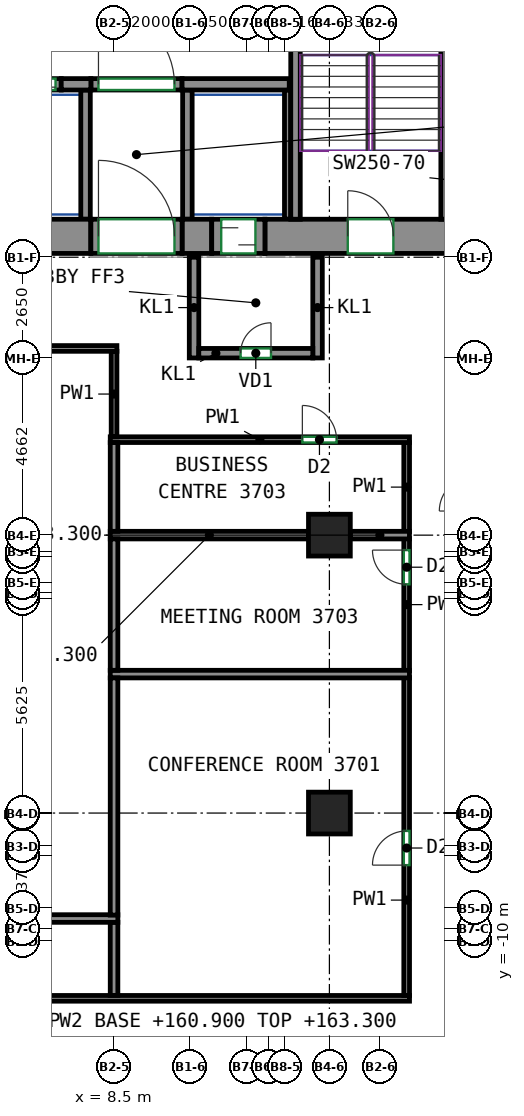
"""IFC4 building model, lengths in metres.
Left out: names, types, materials, properties, quantities, classifications, styles, units other than length and angle.
Written with IfcOpenShell. Run it as: python <this file> out.ifc"""

import sys

from ifc_helpers import new_model, si_unit, direction, frame, frame_2d, origin, origin_2d, place, context, subcontext, project, spatial, rectangle, extrude, source, transform, mapped, element, fill, save


model = new_model("IFC4")
c1 = context("Model", 3, precision=1e-05, world=origin(), true_north=direction((0.0, 1.0)))
c2 = subcontext(c1, "Body", "Model", "MODEL_VIEW")
j1 = project(units=[si_unit("LENGTHUNIT", "METRE"), si_unit("PLANEANGLEUNIT", "RADIAN")], contexts=[c1])
p1 = place(None, origin())
s1 = spatial("IfcSite", under=j1, at=p1, CompositionType="ELEMENT")
p2 = place(p1, origin())
s2 = spatial("IfcBuilding", under=s1, at=p2, CompositionType="ELEMENT")
p3 = place(p2, frame((0.0, 0.0, 160.9)))
s3 = spatial("IfcBuildingStorey", under=s2, at=p3, CompositionType="ELEMENT", Elevation=160.9)
m1 = source(origin(), c2, "Body", "SweptSolid", [
    extrude(rectangle(XDim=1.1, YDim=1.1, at=origin_2d()), origin(), (0.0, 0.0, 1.0), 3.0),
])
for number, where, z_axis, x_axis in (
    (1, (14.167, -6.625, 0.0), (0.0, 0.0, 1.0), (1.0, 0.0, 0.0)),
    (2, (14.167, 0.688, 0.0), (0.0, 0.0, 1.0), (1.0, 0.0, 0.0)),
):
    element("IfcColumn", number, at=place(p3, frame(where, z_axis=z_axis, x_axis=x_axis)), inside=s3, PredefinedType="COLUMN", context=c2, shape_type="MappedRepresentation", body=[
        mapped(m1, transform((0.0, 0.0, 0.0))),
    ])
m2 = source(origin(), c2, "Body", "SweptSolid", [
    extrude(rectangle(XDim=14.18, YDim=0.9, at=frame_2d((7.09, 0.0))), origin(), (0.0, 0.0, 1.0), 3.0),
])
p4 = place(p3, frame((-6.29, 8.55, 0.0), z_axis=(0.0, 0.0, 1.0), x_axis=(1.0, 0.0, 0.0)))
e3 = element("IfcWall", 3, at=p4, inside=s3, PredefinedType="SHEAR", context=c2, shape_type="MappedRepresentation", body=[
    mapped(m2, transform((0.0, 0.0, 0.0))),
])
m3 = source(origin(), c2, "Body", "SweptSolid", [
    extrude(rectangle(XDim=0.78, YDim=0.9, at=frame_2d((0.39, 0.0))), origin(), (0.0, 0.0, 1.0), 3.0),
])
p5 = place(p3, frame((10.29, 8.55, 0.0), z_axis=(0.0, 0.0, 1.0), x_axis=(1.0, 0.0, 0.0)))
e4 = element("IfcWall", 4, at=p5, inside=s3, PredefinedType="SHEAR", context=c2, shape_type="MappedRepresentation", body=[
    mapped(m3, transform((0.0, 0.0, 0.0))),
])
m4 = source(origin(), c2, "Body", "SweptSolid", [
    extrude(rectangle(XDim=5.53, YDim=0.9, at=frame_2d((2.765, 0.0))), origin(), (0.0, 0.0, 1.0), 3.0),
])
p6 = place(p3, frame((12.47, 8.55, 0.0), z_axis=(0.0, 0.0, 1.0), x_axis=(1.0, 0.0, 0.0)))
e5 = element("IfcWall", 5, at=p6, inside=s3, PredefinedType="SHEAR", context=c2, shape_type="MappedRepresentation", body=[
    mapped(m4, transform((0.0, 0.0, 0.0))),
])
p7 = place(p6, frame((2.18, 0.0, 0.0)))
e6 = element("IfcOpeningElement", 6, at=p7, cuts=e5, PredefinedType="OPENING", context=c2, shape_type="SweptSolid", body=[
    extrude(rectangle(XDim=1.2, YDim=2.1, at=frame_2d((0.6, 1.05))), frame((0.0, 0.46, 0.0), z_axis=(0.0, -1.0, 0.0), x_axis=(1.0, 0.0, 0.0)), (0.0, 0.0, 1.0), 0.92),
])
m5 = source(origin(), c2, "Body", "SweptSolid", [
    extrude(rectangle(XDim=12.0, YDim=0.9, at=frame_2d((6.0, 0.0))), origin(), (0.0, 0.0, 1.0), 3.0),
])
p8 = place(p3, frame((17.55, 9.0, 0.0), z_axis=(0.0, 0.0, 1.0), x_axis=(0.0, 1.0, 0.0)))
e7 = element("IfcWall", 7, at=p8, inside=s3, PredefinedType="SHEAR", context=c2, shape_type="MappedRepresentation", body=[
    mapped(m5, transform((0.0, 0.0, 0.0))),
])
m6 = source(origin(), c2, "Body", "SweptSolid", [
    extrude(rectangle(XDim=7.75, YDim=0.25, at=frame_2d((3.875, 0.0))), origin(), (0.0, 0.0, 1.0), 3.0),
])
p9 = place(p3, frame((13.275, 9.0, 0.0), z_axis=(0.0, 0.0, 1.0), x_axis=(0.0, 1.0, 0.0)))
e8 = element("IfcWall", 8, at=p9, inside=s3, PredefinedType="SHEAR", context=c2, shape_type="MappedRepresentation", body=[
    mapped(m6, transform((0.0, 0.0, 0.0))),
])
m7 = source(origin(), c2, "Body", "SweptSolid", [
    extrude(rectangle(XDim=0.78, YDim=0.3, at=frame_2d((0.39, 0.0))), origin(), (0.0, 0.0, 1.0), 3.0),
])
p10 = place(p3, frame((7.11, 12.55, 0.0), z_axis=(0.0, 0.0, 1.0), x_axis=(1.0, 0.0, 0.0)))
e9 = element("IfcWall", 9, at=p10, inside=s3, PredefinedType="SHEAR", context=c2, shape_type="MappedRepresentation", body=[
    mapped(m7, transform((0.0, 0.0, 0.0))),
])
m8 = source(origin(), c2, "Body", "SweptSolid", [
    extrude(rectangle(XDim=2.82, YDim=0.3, at=frame_2d((1.41, 0.0))), origin(), (0.0, 0.0, 1.0), 3.0),
])
p11 = place(p3, frame((10.29, 12.55, 0.0), z_axis=(0.0, 0.0, 1.0), x_axis=(1.0, 0.0, 0.0)))
e10 = element("IfcWall", 10, at=p11, inside=s3, PredefinedType="SHEAR", context=c2, shape_type="MappedRepresentation", body=[
    mapped(m8, transform((0.0, 0.0, 0.0))),
])
m9 = source(origin(), c2, "Body", "SweptSolid", [
    extrude(rectangle(XDim=1.4, YDim=0.3, at=frame_2d((0.7, 0.0))), origin(), (0.0, 0.0, 1.0), 3.0),
])
p12 = place(p3, frame((5.71, 12.55, 0.0), z_axis=(0.0, 0.0, 1.0), x_axis=(1.0, 0.0, 0.0)))
e11 = element("IfcWall", 11, at=p12, inside=s3, PredefinedType="PARTITIONING", context=c2, shape_type="MappedRepresentation", body=[
    mapped(m9, transform((0.0, 0.0, 0.0))),
])
p13 = place(p12, frame((0.15, 0.0, 0.0)))
e12 = element("IfcOpeningElement", 12, at=p13, cuts=e11, PredefinedType="OPENING", context=c2, shape_type="SweptSolid", body=[
    extrude(rectangle(XDim=1.1, YDim=2.1, at=frame_2d((0.55, 1.05))), frame((0.0, 0.16, 0.0), z_axis=(0.0, -1.0, 0.0), x_axis=(1.0, 0.0, 0.0)), (0.0, 0.0, 1.0), 0.32),
])
m10 = source(origin(), c2, "Body", "SweptSolid", [
    extrude(rectangle(XDim=2.4, YDim=0.3, at=frame_2d((1.2, 0.0))), origin(), (0.0, 0.0, 1.0), 3.0),
])
p14 = place(p3, frame((7.89, 12.55, 0.0), z_axis=(0.0, 0.0, 1.0), x_axis=(1.0, 0.0, 0.0)))
e13 = element("IfcWall", 13, at=p14, inside=s3, PredefinedType="PARTITIONING", context=c2, shape_type="MappedRepresentation", body=[
    mapped(m10, transform((0.0, 0.0, 0.0))),
])
p15 = place(p14, frame((0.2, 0.0, 0.0)))
e14 = element("IfcOpeningElement", 14, at=p15, cuts=e13, PredefinedType="OPENING", context=c2, shape_type="SweptSolid", body=[
    extrude(rectangle(XDim=2.0, YDim=2.1, at=frame_2d((1.0, 1.05))), frame((0.0, 0.16, 0.0), z_axis=(0.0, -1.0, 0.0), x_axis=(1.0, 0.0, 0.0)), (0.0, 0.0, 1.0), 0.32),
])
m11 = source(origin(), c2, "Body", "SweptSolid", [
    extrude(rectangle(XDim=2.65, YDim=0.25, at=frame_2d((1.325, 0.0))), origin(), (0.0, 0.0, 1.0), 3.0),
])
for number, where, z_axis, x_axis in (
    (15, (10.605, 5.35, 0.0), (0.0, 0.0, 1.0), (0.0, 1.0, 0.0)),
    (16, (13.855, 5.35, 0.0), (0.0, 0.0, 1.0), (0.0, 1.0, 0.0)),
):
    element("IfcWall", number, at=place(p3, frame(where, z_axis=z_axis, x_axis=x_axis)), inside=s3, PredefinedType="PARTITIONING", context=c2, shape_type="MappedRepresentation", body=[
        mapped(m11, transform((0.0, 0.0, 0.0))),
    ])
m12 = source(origin(), c2, "Body", "SweptSolid", [
    extrude(rectangle(XDim=3.0, YDim=0.25, at=frame_2d((1.5, 0.0))), origin(), (0.0, 0.0, 1.0), 3.0),
])
p16 = place(p3, frame((10.73, 5.475, 0.0), z_axis=(0.0, 0.0, 1.0), x_axis=(1.0, 0.0, 0.0)))
e17 = element("IfcWall", 17, at=p16, inside=s3, PredefinedType="PARTITIONING", context=c2, shape_type="MappedRepresentation", body=[
    mapped(m12, transform((0.0, 0.0, 0.0))),
])
p17 = place(p16, frame((1.1, 0.0, 0.0)))
e18 = element("IfcOpeningElement", 18, at=p17, cuts=e17, PredefinedType="OPENING", context=c2, shape_type="SweptSolid", body=[
    extrude(rectangle(XDim=0.8, YDim=2.0, at=frame_2d((0.4, 1.0))), frame((0.0, 0.135, 0.0), z_axis=(0.0, -1.0, 0.0), x_axis=(1.0, 0.0, 0.0)), (0.0, 0.0, 1.0), 0.27),
])
m13 = source(origin(), c2, "Body", "SweptSolid", [
    extrude(rectangle(XDim=3.4, YDim=0.25, at=frame_2d((1.7, 0.0))), origin(), (0.0, 0.0, 1.0), 3.0),
])
p18 = place(p3, frame((10.43, 9.0, 0.0), z_axis=(0.0, 0.0, 1.0), x_axis=(0.0, 1.0, 0.0)))
e19 = element("IfcWall", 19, at=p18, inside=s3, PredefinedType="PARTITIONING", context=c2, shape_type="MappedRepresentation", body=[
    mapped(m13, transform((0.0, 0.0, 0.0))),
])
m14 = source(origin(), c2, "Body", "SweptSolid", [
    extrude(rectangle(XDim=3.4, YDim=0.165, at=frame_2d((1.7, 0.0))), origin(), (0.0, 0.0, 1.0), 3.0),
])
p19 = place(p3, frame((13.067, 9.0, 0.0), z_axis=(0.0, 0.0, 1.0), x_axis=(0.0, 1.0, 0.0)))
e20 = element("IfcWall", 20, at=p19, inside=s3, PredefinedType="PARTITIONING", context=c2, shape_type="MappedRepresentation", body=[
    mapped(m14, transform((0.0, 0.0, 0.0))),
])
p20 = place(p3, frame((7.75, 9.0, 0.0), z_axis=(0.0, 0.0, 1.0), x_axis=(0.0, 1.0, 0.0)))
e21 = element("IfcWall", 21, at=p20, inside=s3, PredefinedType="PARTITIONING", context=c2, shape_type="MappedRepresentation", body=[
    mapped(m13, transform((0.0, 0.0, 0.0))),
])
m15 = source(origin(), c2, "Body", "SweptSolid", [
    extrude(rectangle(XDim=2.4, YDim=0.9, at=frame_2d((1.2, 0.0))), origin(), (0.0, 0.0, 1.0), 2.7),
])
p21 = place(p3, frame((7.89, 8.55, 0.0), z_axis=(0.0, 0.0, 1.0), x_axis=(1.0, 0.0, 0.0)))
e22 = element("IfcWall", 22, at=p21, inside=s3, PredefinedType="PARTITIONING", context=c2, shape_type="MappedRepresentation", body=[
    mapped(m15, transform((0.0, 0.0, 0.0))),
])
p22 = place(p21, frame((0.2, 0.0, 0.0)))
e23 = element("IfcOpeningElement", 23, at=p22, cuts=e22, PredefinedType="OPENING", context=c2, shape_type="SweptSolid", body=[
    extrude(rectangle(XDim=2.0, YDim=2.1, at=frame_2d((1.0, 1.05))), frame((0.0, 0.46, 0.0), z_axis=(0.0, -1.0, 0.0), x_axis=(1.0, 0.0, 0.0)), (0.0, 0.0, 1.0), 0.92),
])
m16 = source(origin(), c2, "Body", "SweptSolid", [
    extrude(rectangle(XDim=1.4, YDim=0.9, at=frame_2d((0.7, 0.0))), origin(), (0.0, 0.0, 1.0), 2.7),
])
p23 = place(p3, frame((11.07, 8.55, 0.0), z_axis=(0.0, 0.0, 1.0), x_axis=(1.0, 0.0, 0.0)))
e24 = element("IfcWall", 24, at=p23, inside=s3, PredefinedType="PARTITIONING", context=c2, shape_type="MappedRepresentation", body=[
    mapped(m16, transform((0.0, 0.0, 0.0))),
])
p24 = place(p23, frame((0.25, 0.0, 0.0)))
e25 = element("IfcOpeningElement", 25, at=p24, cuts=e24, PredefinedType="OPENING", context=c2, shape_type="SweptSolid", body=[
    extrude(rectangle(XDim=0.9, YDim=2.1, at=frame_2d((0.45, 1.05))), frame((0.0, 0.46, 0.0), z_axis=(0.0, -1.0, 0.0), x_axis=(1.0, 0.0, 0.0)), (0.0, 0.0, 1.0), 0.92),
])
p25 = place(p3, frame((-12.075, -11.5, 0.0), z_axis=(0.0, 0.0, 1.0), x_axis=(1.0, 0.0, 0.0)))
e26 = element("IfcWall", 26, at=p25, inside=s3, PredefinedType="PARTITIONING", context=c2, shape_type="SweptSolid", body=[
    extrude(rectangle(XDim=28.35, YDim=0.15, at=frame_2d((14.175, 0.0))), origin(), (0.0, 0.0, 1.0), 3.0),
])
p26 = place(p25, frame((11.373, 0.0, 0.0)))
e27 = element("IfcOpeningElement", 27, at=p26, cuts=e26, PredefinedType="OPENING", context=c2, shape_type="SweptSolid", body=[
    extrude(rectangle(XDim=0.9, YDim=2.1, at=frame_2d((0.45, 1.05))), frame((0.0, 0.085, 0.0), z_axis=(0.0, -1.0, 0.0), x_axis=(1.0, 0.0, 0.0)), (0.0, 0.0, 1.0), 0.17),
])
p27 = place(p3, frame((16.2, -11.425, 0.0), z_axis=(0.0, 0.0, 1.0), x_axis=(0.0, 1.0, 0.0)))
e28 = element("IfcWall", 28, at=p27, inside=s3, PredefinedType="PARTITIONING", context=c2, shape_type="SweptSolid", body=[
    extrude(rectangle(XDim=8.366, YDim=0.15, at=frame_2d((4.183, 0.0))), origin(), (0.0, 0.0, 1.0), 3.0),
])
p28 = place(p27, frame((3.43, 0.0, 0.0)))
e29 = element("IfcOpeningElement", 29, at=p28, cuts=e28, PredefinedType="OPENING", context=c2, shape_type="SweptSolid", body=[
    extrude(rectangle(XDim=0.9, YDim=2.1, at=frame_2d((0.45, 1.05))), frame((0.0, 0.085, 0.0), z_axis=(0.0, -1.0, 0.0), x_axis=(1.0, 0.0, 0.0)), (0.0, 0.0, 1.0), 0.17),
])
p29 = place(p3, frame((16.2, -2.879, 0.0), z_axis=(0.0, 0.0, 1.0), x_axis=(0.0, 1.0, 0.0)))
e30 = element("IfcWall", 30, at=p29, inside=s3, PredefinedType="PARTITIONING", context=c2, shape_type="SweptSolid", body=[
    extrude(rectangle(XDim=3.477, YDim=0.15, at=frame_2d((1.738, 0.0))), origin(), (0.0, 0.0, 1.0), 3.0),
])
p30 = place(p29, frame((2.273, 0.0, 0.0)))
e31 = element("IfcOpeningElement", 31, at=p30, cuts=e30, PredefinedType="OPENING", context=c2, shape_type="SweptSolid", body=[
    extrude(rectangle(XDim=0.9, YDim=2.1, at=frame_2d((0.45, 1.05))), frame((0.0, 0.085, 0.0), z_axis=(0.0, -1.0, 0.0), x_axis=(1.0, 0.0, 0.0)), (0.0, 0.0, 1.0), 0.17),
])
p31 = place(p3, frame((16.2, 0.778, 0.0), z_axis=(0.0, 0.0, 1.0), x_axis=(0.0, 1.0, 0.0)))
e32 = element("IfcWall", 32, at=p31, inside=s3, PredefinedType="PARTITIONING", context=c2, shape_type="SweptSolid", body=[
    extrude(rectangle(XDim=2.347, YDim=0.15, at=frame_2d((1.173, 0.0))), origin(), (0.0, 0.0, 1.0), 3.0),
])
p32 = place(p3, frame((8.4, 3.2, 0.0), z_axis=(0.0, 0.0, 1.0), x_axis=(1.0, 0.0, 0.0)))
e33 = element("IfcWall", 33, at=p32, inside=s3, PredefinedType="PARTITIONING", context=c2, shape_type="SweptSolid", body=[
    extrude(rectangle(XDim=7.875, YDim=0.15, at=frame_2d((3.938, 0.0))), origin(), (0.0, 0.0, 1.0), 3.0),
])
p33 = place(p32, frame((5.055, 0.0, 0.0)))
e34 = element("IfcOpeningElement", 34, at=p33, cuts=e33, PredefinedType="OPENING", context=c2, shape_type="SweptSolid", body=[
    extrude(rectangle(XDim=0.9, YDim=2.1, at=frame_2d((0.45, 1.05))), frame((0.0, 0.085, 0.0), z_axis=(0.0, -1.0, 0.0), x_axis=(1.0, 0.0, 0.0)), (0.0, 0.0, 1.0), 0.17),
])
p34 = place(p3, frame((8.5, 5.525, 0.0), z_axis=(0.0, 0.0, 1.0), x_axis=(0.0, -1.0, 0.0)))
e35 = element("IfcWall", 35, at=p34, inside=s3, PredefinedType="PARTITIONING", context=c2, shape_type="SweptSolid", body=[
    extrude(rectangle(XDim=2.25, YDim=0.15, at=frame_2d((1.125, 0.0))), origin(), (0.0, 0.0, 1.0), 3.0),
])
p35 = place(p3, frame((-5.4, 5.6, 0.0), z_axis=(0.0, 0.0, 1.0), x_axis=(1.0, 0.0, 0.0)))
e36 = element("IfcWall", 36, at=p35, inside=s3, PredefinedType="PARTITIONING", context=c2, shape_type="SweptSolid", body=[
    extrude(rectangle(XDim=13.975, YDim=0.15, at=frame_2d((6.987, 0.0))), origin(), (0.0, 0.0, 1.0), 3.0),
])
p36 = place(p35, frame((1.91, 0.0, 0.0)))
e37 = element("IfcOpeningElement", 37, at=p36, cuts=e36, PredefinedType="OPENING", context=c2, shape_type="SweptSolid", body=[
    extrude(rectangle(XDim=1.0, YDim=2.1, at=frame_2d((0.5, 1.05))), frame((0.0, 0.085, 0.0), z_axis=(0.0, -1.0, 0.0), x_axis=(1.0, 0.0, 0.0)), (0.0, 0.0, 1.0), 0.17),
])
p37 = place(p3, frame((8.5, -11.423, 0.0), z_axis=(0.0, 0.0, 1.0), x_axis=(0.0, 1.0, 0.0)))
e38 = element("IfcWall", 38, at=p37, inside=s3, PredefinedType="PARTITIONING", context=c2, shape_type="SweptSolid", body=[
    extrude(rectangle(XDim=1.923, YDim=0.2, at=frame_2d((0.961, 0.0))), origin(), (0.0, 0.0, 1.0), 3.0),
])
p38 = place(p3, frame((8.6, -9.4, 0.0), z_axis=(0.0, 0.0, 1.0), x_axis=(-1.0, 0.0, 0.0)))
e39 = element("IfcWall", 39, at=p38, inside=s3, PredefinedType="PARTITIONING", context=c2, shape_type="SweptSolid", body=[
    extrude(rectangle(XDim=15.2, YDim=0.2, at=frame_2d((7.6, 0.0))), origin(), (0.0, 0.0, 1.0), 3.0),
])
p39 = place(p3, frame((8.4, -2.969, 0.0), z_axis=(0.0, 0.0, 1.0), x_axis=(1.0, 0.0, 0.0)))
e40 = element("IfcWall", 40, at=p39, inside=s3, PredefinedType="PARTITIONING", context=c2, shape_type="SweptSolid", body=[
    extrude(rectangle(XDim=7.873, YDim=0.2, at=frame_2d((3.937, 0.0))), origin(), (0.0, 0.0, 1.0), 3.0),
])
p40 = place(p3, frame((8.5, -9.31, 0.0), z_axis=(0.0, 0.0, 1.0), x_axis=(0.0, 1.0, 0.0)))
e41 = element("IfcWall", 41, at=p40, inside=s3, PredefinedType="PARTITIONING", context=c2, shape_type="SweptSolid", body=[
    extrude(rectangle(XDim=6.241, YDim=0.2, at=frame_2d((3.121, 0.0))), origin(), (0.0, 0.0, 1.0), 3.0),
])
p41 = place(p3, frame((14.717, 0.688, 0.0), z_axis=(0.0, 0.0, 1.0), x_axis=(1.0, 0.0, 0.0)))
e42 = element("IfcWall", 42, at=p41, inside=s3, PredefinedType="PARTITIONING", context=c2, shape_type="SweptSolid", body=[
    extrude(rectangle(XDim=1.556, YDim=0.2, at=frame_2d((0.778, 0.0))), origin(), (0.0, 0.0, 1.0), 2.4),
])
p42 = place(p3, frame((8.4, 0.688, 0.0), z_axis=(0.0, 0.0, 1.0), x_axis=(1.0, 0.0, 0.0)))
e43 = element("IfcWall", 43, at=p42, inside=s3, PredefinedType="PARTITIONING", context=c2, shape_type="SweptSolid", body=[
    extrude(rectangle(XDim=5.217, YDim=0.2, at=frame_2d((2.608, 0.0))), origin(), (0.0, 0.0, 1.0), 2.4),
])
p43 = place(p3, frame((8.5, -2.869, 0.0), z_axis=(0.0, 0.0, 1.0), x_axis=(0.0, 1.0, 0.0)))
e44 = element("IfcWall", 44, at=p43, inside=s3, PredefinedType="PARTITIONING", context=c2, shape_type="SweptSolid", body=[
    extrude(rectangle(XDim=3.457, YDim=0.2, at=frame_2d((1.729, 0.0))), origin(), (0.0, 0.0, 1.0), 3.0),
])
p44 = place(p3, frame((8.5, 0.788, 0.0), z_axis=(0.0, 0.0, 1.0), x_axis=(0.0, 1.0, 0.0)))
e45 = element("IfcWall", 45, at=p44, inside=s3, PredefinedType="PARTITIONING", context=c2, shape_type="SweptSolid", body=[
    extrude(rectangle(XDim=2.335, YDim=0.2, at=frame_2d((1.167, 0.0))), origin(), (0.0, 0.0, 1.0), 3.0),
])
p45 = place(p15, origin())
e46 = element("IfcDoor", 46, at=p45, inside=s3, OperationType="DOUBLE_DOOR_SINGLE_SWING", PredefinedType="DOOR", context=c2, shape_type="SweptSolid", body=[
    extrude(rectangle(XDim=2.0, YDim=2.1, at=frame_2d((1.0, 1.05))), frame((0.0, 0.025, 0.0), z_axis=(0.0, -1.0, 0.0), x_axis=(1.0, 0.0, 0.0)), (0.0, 0.0, 1.0), 0.05),
])
fill(e14, e46)
p46 = place(p22, origin())
e47 = element("IfcDoor", 47, at=p46, inside=s3, OperationType="DOUBLE_DOOR_SINGLE_SWING", PredefinedType="DOOR", context=c2, shape_type="SweptSolid", body=[
    extrude(rectangle(XDim=2.0, YDim=2.1, at=frame_2d((1.0, 1.05))), frame((0.0, 0.355, 0.0), z_axis=(0.0, -1.0, 0.0), x_axis=(1.0, 0.0, 0.0)), (0.0, 0.0, 1.0), 0.05),
])
fill(e23, e47)
p47 = place(p17, origin())
e48 = element("IfcDoor", 48, at=p47, inside=s3, OperationType="SINGLE_SWING_RIGHT", PredefinedType="DOOR", context=c2, shape_type="SweptSolid", body=[
    extrude(rectangle(XDim=0.8, YDim=2.0, at=frame_2d((0.4, 1.0))), frame((0.0, 0.025, 0.0), z_axis=(0.0, -1.0, 0.0), x_axis=(1.0, 0.0, 0.0)), (0.0, 0.0, 1.0), 0.05),
])
fill(e18, e48)
p48 = place(p24, origin())
e49 = element("IfcDoor", 49, at=p48, inside=s3, OperationType="SLIDING_TO_LEFT", PredefinedType="DOOR", context=c2, shape_type="SweptSolid", body=[
    extrude(rectangle(XDim=0.9, YDim=2.1, at=frame_2d((0.45, 1.05))), frame((0.0, 0.355, 0.0), z_axis=(0.0, -1.0, 0.0), x_axis=(1.0, 0.0, 0.0)), (0.0, 0.0, 1.0), 0.05),
])
fill(e25, e49)
p49 = place(p13, origin())
e50 = element("IfcDoor", 50, at=p49, inside=s3, OperationType="DOUBLE_DOOR_SLIDING", PredefinedType="DOOR", context=c2, shape_type="SweptSolid", body=[
    extrude(rectangle(XDim=1.1, YDim=2.1, at=frame_2d((0.55, 1.05))), frame((0.0, 0.025, 0.0), z_axis=(0.0, -1.0, 0.0), x_axis=(1.0, 0.0, 0.0)), (0.0, 0.0, 1.0), 0.05),
])
fill(e12, e50)
p50 = place(p7, origin())
e51 = element("IfcDoor", 51, at=p50, inside=s3, OperationType="DOUBLE_DOOR_SINGLE_SWING", PredefinedType="DOOR", context=c2, shape_type="SweptSolid", body=[
    extrude(rectangle(XDim=1.2, YDim=2.1, at=frame_2d((0.6, 1.05))), frame((0.0, 0.355, 0.0), z_axis=(0.0, -1.0, 0.0), x_axis=(1.0, 0.0, 0.0)), (0.0, 0.0, 1.0), 0.05),
])
fill(e6, e51)
p51 = place(p28, origin())
e52 = element("IfcDoor", 52, at=p51, inside=s3, OperationType="SINGLE_SWING_LEFT", PredefinedType="DOOR", context=c2, shape_type="SweptSolid", body=[
    extrude(rectangle(XDim=0.9, YDim=2.1, at=frame_2d((0.45, 1.05))), frame((0.0, 0.025, 0.0), z_axis=(0.0, -1.0, 0.0), x_axis=(1.0, 0.0, 0.0)), (0.0, 0.0, 1.0), 0.05),
])
fill(e29, e52)
p52 = place(p30, origin())
e53 = element("IfcDoor", 53, at=p52, inside=s3, OperationType="SINGLE_SWING_RIGHT", PredefinedType="DOOR", context=c2, shape_type="SweptSolid", body=[
    extrude(rectangle(XDim=0.9, YDim=2.1, at=frame_2d((0.45, 1.05))), frame((0.0, 0.025, 0.0), z_axis=(0.0, -1.0, 0.0), x_axis=(1.0, 0.0, 0.0)), (0.0, 0.0, 1.0), 0.05),
])
fill(e31, e53)
p53 = place(p33, origin())
e54 = element("IfcDoor", 54, at=p53, inside=s3, OperationType="SINGLE_SWING_LEFT", PredefinedType="DOOR", context=c2, shape_type="SweptSolid", body=[
    extrude(rectangle(XDim=0.9, YDim=2.1, at=frame_2d((0.45, 1.05))), frame((0.0, 0.025, 0.0), z_axis=(0.0, -1.0, 0.0), x_axis=(1.0, 0.0, 0.0)), (0.0, 0.0, 1.0), 0.05),
])
fill(e34, e54)
save(model, sys.argv[1])
